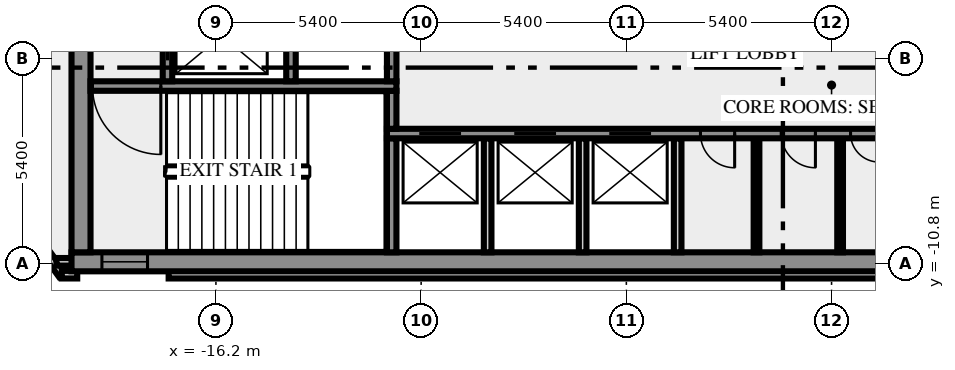
"""IFC4 building model, lengths in metres.
Left out: names, types, materials, properties, quantities, classifications, styles, units other than length and angle.
Written with IfcOpenShell. Run it as: python <this file> out.ifc"""

import sys

from ifc_helpers import new_model, si_unit, direction, frame, frame_2d, origin, place, context, subcontext, project, spatial, rectangle, extrude, element, fill, save


model = new_model("IFC4")
c1 = context("Model", 3, precision=1e-05, world=origin(), true_north=direction((0.0, 1.0)))
c2 = subcontext(c1, "Body", "Model", "MODEL_VIEW")
j1 = project(units=[si_unit("LENGTHUNIT", "METRE"), si_unit("PLANEANGLEUNIT", "RADIAN")], contexts=[c1])
p1 = place(None, origin())
s1 = spatial("IfcSite", under=j1, at=p1, CompositionType="ELEMENT")
p2 = place(p1, origin())
s2 = spatial("IfcBuilding", under=s1, at=p2, CompositionType="ELEMENT")
p3 = place(p2, frame((0.0, 0.0, 85.0)))
s3 = spatial("IfcBuildingStorey", under=s2, at=p3, CompositionType="ELEMENT", Elevation=85.0)
p4 = place(p3, frame((-21.833, -8.909, 0.0), z_axis=(0.0, 0.0, 1.0), x_axis=(0.587766567315, -0.809030569476, 0.0)))
e1 = element("IfcWall", 1, at=p4, inside=s3, PredefinedType="SOLIDWALL", context=c2, shape_type="SweptSolid", body=[
    extrude(rectangle(XDim=2.688, YDim=0.2, at=frame_2d((1.344, 0.0))), origin(), (0.0, 0.0, 1.0), 3.65),
])
p5 = place(p3, frame((-20.256, -11.088, 0.0), z_axis=(0.0, 0.0, 1.0), x_axis=(1.0, 0.0, 0.0)))
e2 = element("IfcWall", 2, at=p5, inside=s3, PredefinedType="SOLIDWALL", context=c2, shape_type="SweptSolid", body=[
    extrude(rectangle(XDim=0.406, YDim=0.2, at=frame_2d((0.203, 0.0))), origin(), (0.0, 0.0, 1.0), 3.65),
])
p6 = place(p3, frame((-17.444, -11.088, 0.0), z_axis=(0.0, 0.0, 1.0), x_axis=(1.0, 0.0, 0.0)))
e3 = element("IfcWall", 3, at=p6, inside=s3, PredefinedType="SOLIDWALL", context=c2, shape_type="SweptSolid", body=[
    extrude(rectangle(XDim=34.888, YDim=0.2, at=frame_2d((17.444, 0.0))), origin(), (0.0, 0.0, 1.0), 3.65),
])
p7 = place(p3, frame((-19.98, -10.75, 0.0), z_axis=(0.0, 0.0, 1.0), x_axis=(-1.0, 0.0, 0.0)))
e4 = element("IfcWall", 4, at=p7, inside=s3, PredefinedType="SOLIDWALL", context=c2, shape_type="SweptSolid", body=[
    extrude(rectangle(XDim=0.417, YDim=0.2, at=frame_2d((0.208, 0.0))), origin(), (0.0, 0.0, 1.0), 3.65),
])
p8 = place(p3, frame((-20.0, -10.75, 0.0), z_axis=(0.0, 0.0, 1.0), x_axis=(1.0, 0.0, 0.0)))
e5 = element("IfcWall", 5, at=p8, inside=s3, PredefinedType="SHEAR", context=c2, shape_type="SweptSolid", body=[
    extrude(rectangle(XDim=40.0, YDim=0.5, at=frame_2d((20.0, 0.0))), origin(), (0.0, 0.0, 1.0), 3.65),
])
p9 = place(p8, frame((0.8, 0.0, 1.0)))
e6 = element("IfcOpeningElement", 6, at=p9, cuts=e5, PredefinedType="OPENING", context=c2, shape_type="SweptSolid", body=[
    extrude(rectangle(XDim=1.2, YDim=1.2, at=frame_2d((0.6, 0.6))), frame((0.0, 0.26, 0.0), z_axis=(0.0, -1.0, 0.0), x_axis=(1.0, 0.0, 0.0)), (0.0, 0.0, 1.0), 0.52),
])
p10 = place(p8, frame((38.0, 0.0, 1.0)))
e7 = element("IfcOpeningElement", 7, at=p10, cuts=e5, PredefinedType="OPENING", context=c2, shape_type="SweptSolid", body=[
    extrude(rectangle(XDim=1.2, YDim=1.2, at=frame_2d((0.6, 0.6))), frame((0.0, 0.26, 0.0), z_axis=(0.0, -1.0, 0.0), x_axis=(1.0, 0.0, 0.0)), (0.0, 0.0, 1.0), 0.52),
])
p11 = place(p3, frame((-19.75, -10.5, 0.0), z_axis=(0.0, 0.0, 1.0), x_axis=(0.0, 1.0, 0.0)))
e8 = element("IfcWall", 8, at=p11, inside=s3, PredefinedType="SHEAR", context=c2, shape_type="SweptSolid", body=[
    extrude(rectangle(XDim=8.8, YDim=0.5, at=frame_2d((4.4, 0.0))), origin(), (0.0, 0.0, 1.0), 3.65),
])
p12 = place(p3, frame((-11.575, -10.5, 0.0), z_axis=(0.0, 0.0, 1.0), x_axis=(0.0, 1.0, 0.0)))
e9 = element("IfcWall", 9, at=p12, inside=s3, PredefinedType="SHEAR", context=c2, shape_type="SweptSolid", body=[
    extrude(rectangle(XDim=3.0, YDim=0.25, at=frame_2d((1.5, 0.0))), origin(), (0.0, 0.0, 1.0), 3.65),
])
for number, where, z_axis, x_axis in (
    (10, (-9.05, -10.5, 0.0), (0.0, 0.0, 1.0), (0.0, 1.0, 0.0)),
    (11, (-6.55, -10.5, 0.0), (0.0, 0.0, 1.0), (0.0, 1.0, 0.0)),
    (12, (-4.05, -10.5, 0.0), (0.0, 0.0, 1.0), (0.0, 1.0, 0.0)),
):
    element("IfcWall", number, at=place(p3, frame(where, z_axis=z_axis, x_axis=x_axis)), inside=s3, PredefinedType="SOLIDWALL", context=c2, shape_type="SweptSolid", body=[
        extrude(rectangle(XDim=3.0, YDim=0.2, at=frame_2d((1.5, 0.0))), origin(), (0.0, 0.0, 1.0), 3.65),
    ])
for number, where, z_axis, x_axis in (
    (13, (-1.975, -10.5, 0.0), (0.0, 0.0, 1.0), (0.0, 1.0, 0.0)),
    (14, (0.225, -10.5, 0.0), (0.0, 0.0, 1.0), (0.0, 1.0, 0.0)),
):
    element("IfcWall", number, at=place(p3, frame(where, z_axis=z_axis, x_axis=x_axis)), inside=s3, PredefinedType="PARTITIONING", context=c2, shape_type="SweptSolid", body=[
        extrude(rectangle(XDim=3.0, YDim=0.15, at=frame_2d((1.5, 0.0))), origin(), (0.0, 0.0, 1.0), 3.65),
    ])
p13 = place(p3, frame((11.7, -7.375, 0.0), z_axis=(0.0, 0.0, 1.0), x_axis=(-1.0, 0.0, 0.0)))
e15 = element("IfcWall", 15, at=p13, inside=s3, PredefinedType="SHEAR", context=c2, shape_type="SweptSolid", body=[
    extrude(rectangle(XDim=23.4, YDim=0.25, at=frame_2d((11.7, 0.0))), origin(), (0.0, 0.0, 1.0), 3.65),
])
p14 = place(p13, frame((21.45, 0.0, 0.0)))
e16 = element("IfcOpeningElement", 16, at=p14, cuts=e15, PredefinedType="OPENING", context=c2, shape_type="SweptSolid", body=[
    extrude(rectangle(XDim=1.1, YDim=2.1, at=frame_2d((0.55, 1.05))), frame((0.0, 0.135, 0.0), z_axis=(0.0, -1.0, 0.0), x_axis=(1.0, 0.0, 0.0)), (0.0, 0.0, 1.0), 0.27),
])
p15 = place(p13, frame((18.95, 0.0, 0.0)))
e17 = element("IfcOpeningElement", 17, at=p15, cuts=e15, PredefinedType="OPENING", context=c2, shape_type="SweptSolid", body=[
    extrude(rectangle(XDim=1.1, YDim=2.1, at=frame_2d((0.55, 1.05))), frame((0.0, 0.135, 0.0), z_axis=(0.0, -1.0, 0.0), x_axis=(1.0, 0.0, 0.0)), (0.0, 0.0, 1.0), 0.27),
])
p16 = place(p13, frame((16.45, 0.0, 0.0)))
e18 = element("IfcOpeningElement", 18, at=p16, cuts=e15, PredefinedType="OPENING", context=c2, shape_type="SweptSolid", body=[
    extrude(rectangle(XDim=1.1, YDim=2.1, at=frame_2d((0.55, 1.05))), frame((0.0, 0.135, 0.0), z_axis=(0.0, -1.0, 0.0), x_axis=(1.0, 0.0, 0.0)), (0.0, 0.0, 1.0), 0.27),
])
p17 = place(p13, frame((14.25, 0.0, 0.0)))
e19 = element("IfcOpeningElement", 19, at=p17, cuts=e15, PredefinedType="OPENING", context=c2, shape_type="SweptSolid", body=[
    extrude(rectangle(XDim=0.9, YDim=2.1, at=frame_2d((0.45, 1.05))), frame((0.0, 0.135, 0.0), z_axis=(0.0, -1.0, 0.0), x_axis=(1.0, 0.0, 0.0)), (0.0, 0.0, 1.0), 0.27),
])
p18 = place(p13, frame((12.125, 0.0, 0.0)))
e20 = element("IfcOpeningElement", 20, at=p18, cuts=e15, PredefinedType="OPENING", context=c2, shape_type="SweptSolid", body=[
    extrude(rectangle(XDim=0.9, YDim=2.1, at=frame_2d((0.45, 1.05))), frame((0.0, 0.135, 0.0), z_axis=(0.0, -1.0, 0.0), x_axis=(1.0, 0.0, 0.0)), (0.0, 0.0, 1.0), 0.27),
])
p19 = place(p13, frame((10.45, 0.0, 0.0)))
e21 = element("IfcOpeningElement", 21, at=p19, cuts=e15, PredefinedType="OPENING", context=c2, shape_type="SweptSolid", body=[
    extrude(rectangle(XDim=0.75, YDim=2.1, at=frame_2d((0.375, 1.05))), frame((0.0, 0.135, 0.0), z_axis=(0.0, -1.0, 0.0), x_axis=(1.0, 0.0, 0.0)), (0.0, 0.0, 1.0), 0.27),
])
p20 = place(p3, frame((-11.575, -7.25, 0.0), z_axis=(0.0, 0.0, 1.0), x_axis=(0.0, 1.0, 0.0)))
e22 = element("IfcWall", 22, at=p20, inside=s3, PredefinedType="SHEAR", context=c2, shape_type="SweptSolid", body=[
    extrude(rectangle(XDim=1.0, YDim=0.25, at=frame_2d((0.5, 0.0))), origin(), (0.0, 0.0, 1.0), 3.65),
])
p21 = place(p3, frame((-11.45, -6.125, 0.0), z_axis=(0.0, 0.0, 1.0), x_axis=(-1.0, 0.0, 0.0)))
e23 = element("IfcWall", 23, at=p21, inside=s3, PredefinedType="SHEAR", context=c2, shape_type="SweptSolid", body=[
    extrude(rectangle(XDim=8.05, YDim=0.25, at=frame_2d((4.025, 0.0))), origin(), (0.0, 0.0, 1.0), 3.65),
])
p22 = place(p21, frame((6.2, 0.0, 0.0)))
e24 = element("IfcOpeningElement", 24, at=p22, cuts=e23, PredefinedType="OPENING", context=c2, shape_type="SweptSolid", body=[
    extrude(rectangle(XDim=1.8, YDim=2.1, at=frame_2d((0.9, 1.05))), frame((0.0, 0.135, 0.0), z_axis=(0.0, -1.0, 0.0), x_axis=(1.0, 0.0, 0.0)), (0.0, 0.0, 1.0), 0.27),
])
p23 = place(p3, frame((-17.475, -6.0, 0.0), z_axis=(0.0, 0.0, 1.0), x_axis=(0.0, 1.0, 0.0)))
e25 = element("IfcWall", 25, at=p23, inside=s3, PredefinedType="SHEAR", context=c2, shape_type="SweptSolid", body=[
    extrude(rectangle(XDim=4.3, YDim=0.25, at=frame_2d((2.15, 0.0))), origin(), (0.0, 0.0, 1.0), 3.65),
])
p24 = place(p23, frame((0.55, 0.0, 0.0)))
e26 = element("IfcOpeningElement", 26, at=p24, cuts=e25, PredefinedType="OPENING", context=c2, shape_type="SweptSolid", body=[
    extrude(rectangle(XDim=1.3, YDim=2.1, at=frame_2d((0.65, 1.05))), frame((0.0, 0.135, 0.0), z_axis=(0.0, -1.0, 0.0), x_axis=(1.0, 0.0, 0.0)), (0.0, 0.0, 1.0), 0.27),
])
for number, where, z_axis, x_axis in (
    (27, (-14.225, -6.0, 0.0), (0.0, 0.0, 1.0), (0.0, 1.0, 0.0)),
    (28, (-11.575, -6.0, 0.0), (0.0, 0.0, 1.0), (0.0, 1.0, 0.0)),
):
    element("IfcWall", number, at=place(p3, frame(where, z_axis=z_axis, x_axis=x_axis)), inside=s3, PredefinedType="SHEAR", context=c2, shape_type="SweptSolid", body=[
        extrude(rectangle(XDim=1.75, YDim=0.25, at=frame_2d((0.875, 0.0))), origin(), (0.0, 0.0, 1.0), 3.65),
    ])
p25 = place(p9, origin())
e29 = element("IfcWindow", 29, at=p25, inside=s3, PartitioningType="SINGLE_PANEL", PredefinedType="WINDOW", context=c2, shape_type="SweptSolid", body=[
    extrude(rectangle(XDim=1.2, YDim=1.2, at=frame_2d((0.6, 0.6))), frame((0.0, 0.03, 0.0), z_axis=(0.0, -1.0, 0.0), x_axis=(1.0, 0.0, 0.0)), (0.0, 0.0, 1.0), 0.06),
])
fill(e6, e29)
p26 = place(p14, origin())
e30 = element("IfcDoor", 30, at=p26, inside=s3, OperationType="DOUBLE_DOOR_SLIDING", PredefinedType="DOOR", context=c2, shape_type="SweptSolid", body=[
    extrude(rectangle(XDim=1.1, YDim=2.1, at=frame_2d((0.55, 1.05))), frame((0.0, 0.025, 0.0), z_axis=(0.0, -1.0, 0.0), x_axis=(1.0, 0.0, 0.0)), (0.0, 0.0, 1.0), 0.05),
])
fill(e16, e30)
p27 = place(p15, origin())
e31 = element("IfcDoor", 31, at=p27, inside=s3, OperationType="DOUBLE_DOOR_SLIDING", PredefinedType="DOOR", context=c2, shape_type="SweptSolid", body=[
    extrude(rectangle(XDim=1.1, YDim=2.1, at=frame_2d((0.55, 1.05))), frame((0.0, 0.025, 0.0), z_axis=(0.0, -1.0, 0.0), x_axis=(1.0, 0.0, 0.0)), (0.0, 0.0, 1.0), 0.05),
])
fill(e17, e31)
p28 = place(p16, origin())
e32 = element("IfcDoor", 32, at=p28, inside=s3, OperationType="DOUBLE_DOOR_SLIDING", PredefinedType="DOOR", context=c2, shape_type="SweptSolid", body=[
    extrude(rectangle(XDim=1.1, YDim=2.1, at=frame_2d((0.55, 1.05))), frame((0.0, 0.025, 0.0), z_axis=(0.0, -1.0, 0.0), x_axis=(1.0, 0.0, 0.0)), (0.0, 0.0, 1.0), 0.05),
])
fill(e18, e32)
p29 = place(p17, origin())
e33 = element("IfcDoor", 33, at=p29, inside=s3, OperationType="SINGLE_SWING_RIGHT", PredefinedType="DOOR", context=c2, shape_type="SweptSolid", body=[
    extrude(rectangle(XDim=0.9, YDim=2.1, at=frame_2d((0.45, 1.05))), frame((0.0, 0.025, 0.0), z_axis=(0.0, -1.0, 0.0), x_axis=(1.0, 0.0, 0.0)), (0.0, 0.0, 1.0), 0.05),
])
fill(e19, e33)
p30 = place(p18, origin())
e34 = element("IfcDoor", 34, at=p30, inside=s3, OperationType="SINGLE_SWING_RIGHT", PredefinedType="DOOR", context=c2, shape_type="SweptSolid", body=[
    extrude(rectangle(XDim=0.9, YDim=2.1, at=frame_2d((0.45, 1.05))), frame((0.0, 0.025, 0.0), z_axis=(0.0, -1.0, 0.0), x_axis=(1.0, 0.0, 0.0)), (0.0, 0.0, 1.0), 0.05),
])
fill(e20, e34)
p31 = place(p19, origin())
e35 = element("IfcDoor", 35, at=p31, inside=s3, OperationType="SINGLE_SWING_LEFT", PredefinedType="DOOR", context=c2, shape_type="SweptSolid", body=[
    extrude(rectangle(XDim=0.75, YDim=2.1, at=frame_2d((0.375, 1.05))), frame((0.0, 0.025, 0.0), z_axis=(0.0, -1.0, 0.0), x_axis=(1.0, 0.0, 0.0)), (0.0, 0.0, 1.0), 0.05),
])
fill(e21, e35)
p32 = place(p22, origin())
e36 = element("IfcDoor", 36, at=p32, inside=s3, OperationType="DOUBLE_DOOR_SINGLE_SWING", PredefinedType="DOOR", context=c2, shape_type="SweptSolid", body=[
    extrude(rectangle(XDim=1.8, YDim=2.1, at=frame_2d((0.9, 1.05))), frame((0.0, 0.025, 0.0), z_axis=(0.0, -1.0, 0.0), x_axis=(1.0, 0.0, 0.0)), (0.0, 0.0, 1.0), 0.05),
])
fill(e24, e36)
p33 = place(p24, origin())
e37 = element("IfcDoor", 37, at=p33, inside=s3, OperationType="DOUBLE_DOOR_SLIDING", PredefinedType="DOOR", context=c2, shape_type="SweptSolid", body=[
    extrude(rectangle(XDim=1.3, YDim=2.1, at=frame_2d((0.65, 1.05))), frame((0.0, 0.025, 0.0), z_axis=(0.0, -1.0, 0.0), x_axis=(1.0, 0.0, 0.0)), (0.0, 0.0, 1.0), 0.05),
])
fill(e26, e37)
save(model, sys.argv[1])
